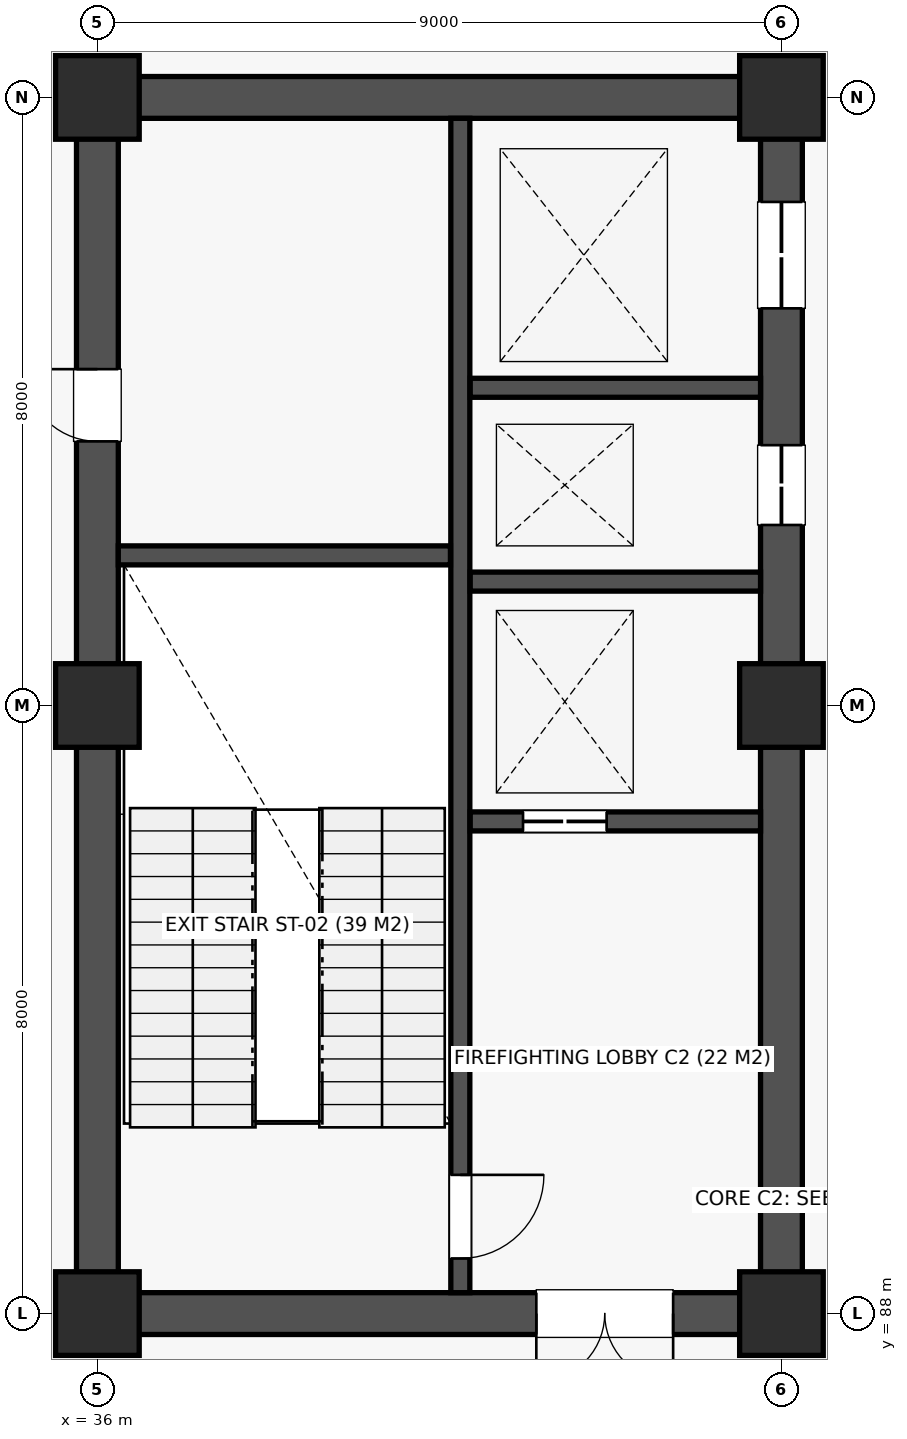
"""IFC4 building model, lengths in metres.
Left out: names, types, materials, properties, quantities, classifications, styles, units other than length and angle.
Written with IfcOpenShell. Run it as: python <this file> out.ifc"""

import sys

from ifc_helpers import new_model, si_unit, direction, frame, frame_2d, origin, origin_2d, place, context, subcontext, project, spatial, rectangle, extrude, element, fill, save


model = new_model("IFC4")
c1 = context("Model", 3, precision=1e-05, world=origin(), true_north=direction((0.0, 1.0)))
c2 = subcontext(c1, "Body", "Model", "MODEL_VIEW")
j1 = project(units=[si_unit("LENGTHUNIT", "METRE"), si_unit("PLANEANGLEUNIT", "RADIAN")], contexts=[c1])
p1 = place(None, origin())
s1 = spatial("IfcSite", under=j1, at=p1, CompositionType="ELEMENT")
p2 = place(p1, origin())
s2 = spatial("IfcBuilding", under=s1, at=p2, CompositionType="ELEMENT")
p3 = place(p2, origin())
s3 = spatial("IfcBuildingStorey", under=s2, at=p3, CompositionType="ELEMENT", Elevation=0.0)
for number, where, z_axis, x_axis in (
    (1, (36.0, 88.0, 0.0), (0.0, 0.0, 1.0), (1.0, 0.0, 0.0)),
    (2, (36.0, 96.0, 0.0), (0.0, 0.0, 1.0), (1.0, 0.0, 0.0)),
    (3, (36.0, 104.0, 0.0), (0.0, 0.0, 1.0), (1.0, 0.0, 0.0)),
    (4, (45.0, 88.0, 0.0), (0.0, 0.0, 1.0), (1.0, 0.0, 0.0)),
    (5, (45.0, 96.0, 0.0), (0.0, 0.0, 1.0), (1.0, 0.0, 0.0)),
    (6, (45.0, 104.0, 0.0), (0.0, 0.0, 1.0), (1.0, 0.0, 0.0)),
):
    element("IfcColumn", number, at=place(p3, frame(where, z_axis=z_axis, x_axis=x_axis)), inside=s3, PredefinedType="COLUMN", context=c2, shape_type="SweptSolid", body=[
        extrude(rectangle(XDim=1.1, YDim=1.1, at=origin_2d()), origin(), (0.0, 0.0, 1.0), 4.5),
    ])
p4 = place(p3, frame((36.275, 88.0, 0.0), z_axis=(0.0, 0.0, 1.0), x_axis=(1.0, 0.0, 0.0)))
e7 = element("IfcWall", 7, at=p4, inside=s3, PredefinedType="SHEAR", context=c2, shape_type="SweptSolid", body=[
    extrude(rectangle(XDim=8.45, YDim=0.55, at=frame_2d((4.225, 0.0))), origin(), (0.0, 0.0, 1.0), 3.3),
])
p5 = place(p4, frame((5.5, 0.0, 0.0)))
e8 = element("IfcOpeningElement", 8, at=p5, cuts=e7, PredefinedType="OPENING", context=c2, shape_type="SweptSolid", body=[
    extrude(rectangle(XDim=1.8, YDim=2.18, at=frame_2d((0.9, 1.09))), frame((0.0, 0.287, 0.0), z_axis=(0.0, -1.0, 0.0), x_axis=(1.0, 0.0, 0.0)), (0.0, 0.0, 1.0), 0.574),
])
p6 = place(p3, frame((36.275, 104.0, 0.0), z_axis=(0.0, 0.0, 1.0), x_axis=(1.0, 0.0, 0.0)))
e9 = element("IfcWall", 9, at=p6, inside=s3, PredefinedType="SHEAR", context=c2, shape_type="SweptSolid", body=[
    extrude(rectangle(XDim=8.45, YDim=0.55, at=frame_2d((4.225, 0.0))), origin(), (0.0, 0.0, 1.0), 3.3),
])
p7 = place(p3, frame((36.0, 88.275, 0.0), z_axis=(0.0, 0.0, 1.0), x_axis=(0.0, 1.0, 0.0)))
e10 = element("IfcWall", 10, at=p7, inside=s3, PredefinedType="SHEAR", context=c2, shape_type="SweptSolid", body=[
    extrude(rectangle(XDim=15.45, YDim=0.55, at=frame_2d((7.725, 0.0))), origin(), (0.0, 0.0, 1.0), 3.3),
])
p8 = place(p7, frame((11.2, 0.0, 0.0)))
e11 = element("IfcOpeningElement", 11, at=p8, cuts=e10, PredefinedType="OPENING", context=c2, shape_type="SweptSolid", body=[
    extrude(rectangle(XDim=0.95, YDim=2.1, at=frame_2d((0.475, 1.05))), frame((0.0, 0.287, 0.0), z_axis=(0.0, -1.0, 0.0), x_axis=(1.0, 0.0, 0.0)), (0.0, 0.0, 1.0), 0.574),
])
p9 = place(p3, frame((45.0, 88.275, 0.0), z_axis=(0.0, 0.0, 1.0), x_axis=(0.0, 1.0, 0.0)))
e12 = element("IfcWall", 12, at=p9, inside=s3, PredefinedType="SHEAR", context=c2, shape_type="SweptSolid", body=[
    extrude(rectangle(XDim=15.45, YDim=0.55, at=frame_2d((7.725, 0.0))), origin(), (0.0, 0.0, 1.0), 3.3),
])
p10 = place(p9, frame((10.1, 0.0, 0.0)))
e13 = element("IfcOpeningElement", 13, at=p10, cuts=e12, PredefinedType="OPENING", context=c2, shape_type="SweptSolid", body=[
    extrude(rectangle(XDim=1.05, YDim=2.12, at=frame_2d((0.525, 1.06))), frame((0.0, 0.287, 0.0), z_axis=(0.0, -1.0, 0.0), x_axis=(1.0, 0.0, 0.0)), (0.0, 0.0, 1.0), 0.574),
])
p11 = place(p9, frame((12.95, 0.0, 0.0)))
e14 = element("IfcOpeningElement", 14, at=p11, cuts=e12, PredefinedType="OPENING", context=c2, shape_type="SweptSolid", body=[
    extrude(rectangle(XDim=1.4, YDim=2.2, at=frame_2d((0.7, 1.1))), frame((0.0, 0.287, 0.0), z_axis=(0.0, -1.0, 0.0), x_axis=(1.0, 0.0, 0.0)), (0.0, 0.0, 1.0), 0.574),
])
p12 = place(p3, frame((40.775, 88.275, 0.0), z_axis=(0.0, 0.0, 1.0), x_axis=(0.0, 1.0, 0.0)))
e15 = element("IfcWall", 15, at=p12, inside=s3, PredefinedType="SOLIDWALL", context=c2, shape_type="SweptSolid", body=[
    extrude(rectangle(XDim=15.45, YDim=0.25, at=frame_2d((7.725, 0.0))), origin(), (0.0, 0.0, 1.0), 3.3),
])
p13 = place(p12, frame((0.45, 0.0, 0.0)))
e16 = element("IfcOpeningElement", 16, at=p13, cuts=e15, PredefinedType="OPENING", context=c2, shape_type="SweptSolid", body=[
    extrude(rectangle(XDim=1.1, YDim=2.15, at=frame_2d((0.55, 1.075))), frame((0.0, 0.137, 0.0), z_axis=(0.0, -1.0, 0.0), x_axis=(1.0, 0.0, 0.0)), (0.0, 0.0, 1.0), 0.274),
])
p14 = place(p3, frame((36.275, 97.975, 0.0), z_axis=(0.0, 0.0, 1.0), x_axis=(1.0, 0.0, 0.0)))
e17 = element("IfcWall", 17, at=p14, inside=s3, PredefinedType="SOLIDWALL", context=c2, shape_type="SweptSolid", body=[
    extrude(rectangle(XDim=4.37, YDim=0.25, at=frame_2d((2.185, 0.0))), origin(), (0.0, 0.0, 1.0), 3.3),
])
p15 = place(p3, frame((40.905, 94.475, 0.0), z_axis=(0.0, 0.0, 1.0), x_axis=(1.0, 0.0, 0.0)))
e18 = element("IfcWall", 18, at=p15, inside=s3, PredefinedType="SOLIDWALL", context=c2, shape_type="SweptSolid", body=[
    extrude(rectangle(XDim=3.82, YDim=0.25, at=frame_2d((1.91, 0.0))), origin(), (0.0, 0.0, 1.0), 3.3),
])
p16 = place(p15, frame((0.695, 0.0, 0.0)))
e19 = element("IfcOpeningElement", 19, at=p16, cuts=e18, PredefinedType="OPENING", context=c2, shape_type="SweptSolid", body=[
    extrude(rectangle(XDim=1.1, YDim=2.12, at=frame_2d((0.55, 1.06))), frame((0.0, 0.137, 0.0), z_axis=(0.0, -1.0, 0.0), x_axis=(1.0, 0.0, 0.0)), (0.0, 0.0, 1.0), 0.274),
])
for number, where, z_axis, x_axis in (
    (20, (40.905, 97.63, 0.0), (0.0, 0.0, 1.0), (1.0, 0.0, 0.0)),
    (21, (40.905, 100.18, 0.0), (0.0, 0.0, 1.0), (1.0, 0.0, 0.0)),
):
    element("IfcWall", number, at=place(p3, frame(where, z_axis=z_axis, x_axis=x_axis)), inside=s3, PredefinedType="SOLIDWALL", context=c2, shape_type="SweptSolid", body=[
        extrude(rectangle(XDim=3.82, YDim=0.25, at=frame_2d((1.91, 0.0))), origin(), (0.0, 0.0, 1.0), 3.3),
    ])
p17 = place(p5, frame((1.8, 0.0, 0.0), z_axis=(0.0, 0.0, 1.0), x_axis=(-1.0, 0.0, 0.0)))
e22 = element("IfcDoor", 22, at=p17, inside=s3, OperationType="DOUBLE_DOOR_SINGLE_SWING", PredefinedType="DOOR", context=c2, shape_type="SweptSolid", body=[
    extrude(rectangle(XDim=1.8, YDim=2.18, at=frame_2d((0.9, 1.09))), frame((0.0, 0.025, 0.0), z_axis=(0.0, -1.0, 0.0), x_axis=(1.0, 0.0, 0.0)), (0.0, 0.0, 1.0), 0.05),
])
fill(e8, e22)
p18 = place(p13, frame((1.1, 0.0, 0.0), z_axis=(0.0, 0.0, 1.0), x_axis=(-1.0, 0.0, 0.0)))
e23 = element("IfcDoor", 23, at=p18, inside=s3, OperationType="SINGLE_SWING_LEFT", PredefinedType="DOOR", context=c2, shape_type="SweptSolid", body=[
    extrude(rectangle(XDim=1.1, YDim=2.15, at=frame_2d((0.55, 1.075))), frame((0.0, 0.025, 0.0), z_axis=(0.0, -1.0, 0.0), x_axis=(1.0, 0.0, 0.0)), (0.0, 0.0, 1.0), 0.05),
])
fill(e16, e23)
p19 = place(p8, origin())
e24 = element("IfcDoor", 24, at=p19, inside=s3, OperationType="SINGLE_SWING_RIGHT", PredefinedType="DOOR", context=c2, shape_type="SweptSolid", body=[
    extrude(rectangle(XDim=0.95, YDim=2.1, at=frame_2d((0.475, 1.05))), frame((0.0, 0.025, 0.0), z_axis=(0.0, -1.0, 0.0), x_axis=(1.0, 0.0, 0.0)), (0.0, 0.0, 1.0), 0.05),
])
fill(e11, e24)
p20 = place(p16, origin())
e25 = element("IfcDoor", 25, at=p20, inside=s3, OperationType="DOUBLE_DOOR_SLIDING", PredefinedType="DOOR", context=c2, shape_type="SweptSolid", body=[
    extrude(rectangle(XDim=1.1, YDim=2.12, at=frame_2d((0.55, 1.06))), frame((0.0, 0.025, 0.0), z_axis=(0.0, -1.0, 0.0), x_axis=(1.0, 0.0, 0.0)), (0.0, 0.0, 1.0), 0.05),
])
fill(e19, e25)
p21 = place(p10, origin())
e26 = element("IfcDoor", 26, at=p21, inside=s3, OperationType="DOUBLE_DOOR_SLIDING", PredefinedType="DOOR", context=c2, shape_type="SweptSolid", body=[
    extrude(rectangle(XDim=1.05, YDim=2.12, at=frame_2d((0.525, 1.06))), frame((0.0, 0.025, 0.0), z_axis=(0.0, -1.0, 0.0), x_axis=(1.0, 0.0, 0.0)), (0.0, 0.0, 1.0), 0.05),
])
fill(e13, e26)
p22 = place(p11, origin())
e27 = element("IfcDoor", 27, at=p22, inside=s3, OperationType="DOUBLE_DOOR_SLIDING", PredefinedType="DOOR", context=c2, shape_type="SweptSolid", body=[
    extrude(rectangle(XDim=1.4, YDim=2.2, at=frame_2d((0.7, 1.1))), frame((0.0, 0.025, 0.0), z_axis=(0.0, -1.0, 0.0), x_axis=(1.0, 0.0, 0.0)), (0.0, 0.0, 1.0), 0.05),
])
fill(e14, e27)
save(model, sys.argv[1])
